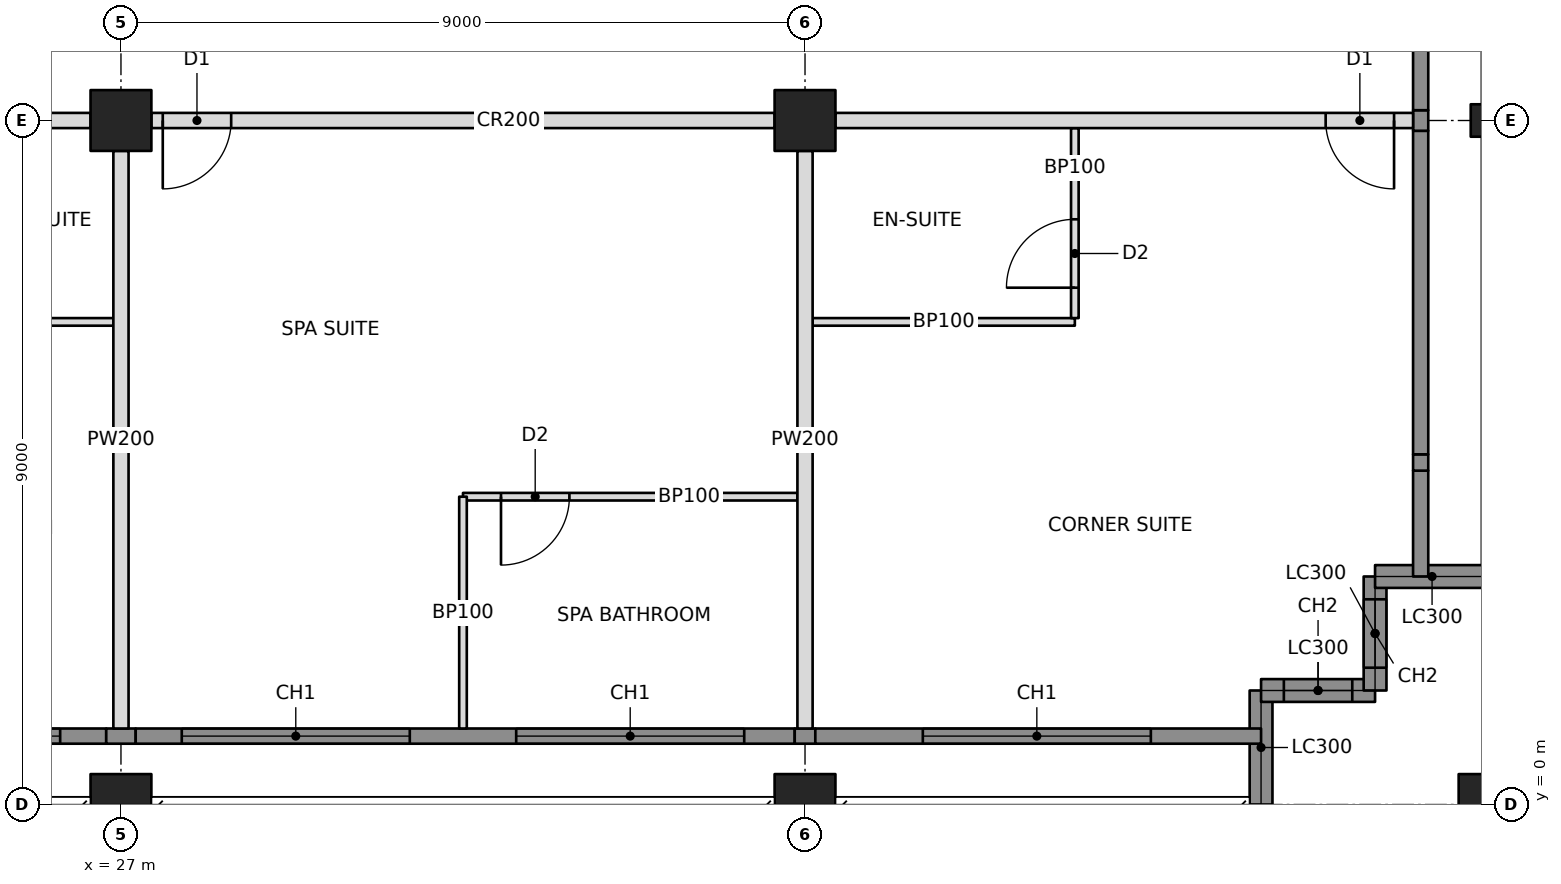
"""IFC4 building model, lengths in metres.
Left out: names, types, materials, properties, quantities, classifications, styles, units other than length and angle.
Written with IfcOpenShell. Run it as: python <this file> out.ifc"""

import sys

from ifc_helpers import new_model, si_unit, direction, frame, frame_2d, origin, origin_2d, place, context, subcontext, project, spatial, rectangle, hollow_rectangle, i_section, extrude, element, fill, save


model = new_model("IFC4")
c1 = context("Model", 3, precision=1e-05, world=origin(), true_north=direction((0.0, 1.0)))
c2 = subcontext(c1, "Body", "Model", "MODEL_VIEW")
j1 = project(units=[si_unit("LENGTHUNIT", "METRE"), si_unit("PLANEANGLEUNIT", "RADIAN")], contexts=[c1])
p1 = place(None, origin())
s1 = spatial("IfcSite", under=j1, at=p1, CompositionType="ELEMENT")
p2 = place(p1, origin())
s2 = spatial("IfcBuilding", under=s1, at=p2, CompositionType="ELEMENT")
p3 = place(p2, frame((0.0, 0.0, 197.8)))
s3 = spatial("IfcBuildingStorey", under=s2, at=p3, CompositionType="ELEMENT", Elevation=197.8)
p4 = place(p3, frame((27.0, 0.0, 0.0), z_axis=(0.0, 0.0, 1.0), x_axis=(1.0, 0.0, 0.0)))
e1 = element("IfcColumn", 1, at=p4, inside=s3, PredefinedType="COLUMN", context=c2, shape_type="SweptSolid", body=[
    extrude(hollow_rectangle(XDim=0.8, YDim=0.8, WallThickness=0.06, at=origin_2d()), origin(), (0.0, 0.0, 1.0), 3.4),
])
p5 = place(p3, frame((27.0, 9.0, 0.0), z_axis=(0.0, 0.0, 1.0), x_axis=(1.0, 0.0, 0.0)))
e2 = element("IfcColumn", 2, at=p5, inside=s3, PredefinedType="COLUMN", context=c2, shape_type="SweptSolid", body=[
    extrude(hollow_rectangle(XDim=0.8, YDim=0.8, WallThickness=0.05, at=origin_2d()), origin(), (0.0, 0.0, 1.0), 3.4),
])
p6 = place(p3, frame((36.0, 0.0, 0.0), z_axis=(0.0, 0.0, 1.0), x_axis=(1.0, 0.0, 0.0)))
e3 = element("IfcColumn", 3, at=p6, inside=s3, PredefinedType="COLUMN", context=c2, shape_type="SweptSolid", body=[
    extrude(hollow_rectangle(XDim=0.8, YDim=0.8, WallThickness=0.06, at=origin_2d()), origin(), (0.0, 0.0, 1.0), 3.4),
])
p7 = place(p3, frame((36.0, 9.0, 0.0), z_axis=(0.0, 0.0, 1.0), x_axis=(0.0, 1.0, 0.0)))
e4 = element("IfcColumn", 4, at=p7, inside=s3, PredefinedType="COLUMN", context=c2, shape_type="SweptSolid", body=[
    extrude(hollow_rectangle(XDim=0.8, YDim=0.8, WallThickness=0.05, at=origin_2d()), origin(), (0.0, 0.0, 1.0), 3.4),
])
p8 = place(p3, frame((45.0, 0.0, 0.0), z_axis=(0.0, 0.0, 1.0), x_axis=(1.0, 0.0, 0.0)))
e5 = element("IfcColumn", 5, at=p8, inside=s3, PredefinedType="COLUMN", context=c2, shape_type="SweptSolid", body=[
    extrude(hollow_rectangle(XDim=0.8, YDim=0.8, WallThickness=0.06, at=origin_2d()), origin(), (0.0, 0.0, 1.0), 3.4),
])
p9 = place(p3, frame((45.0, 9.0, 0.0), z_axis=(0.0, 0.0, 1.0), x_axis=(0.0, 1.0, 0.0)))
e6 = element("IfcColumn", 6, at=p9, inside=s3, PredefinedType="COLUMN", context=c2, shape_type="SweptSolid", body=[
    extrude(i_section(OverallWidth=0.427, OverallDepth=0.483, WebThickness=0.051, FlangeThickness=0.082, at=origin_2d()), origin(), (0.0, 0.0, 1.0), 3.4),
])
p10 = place(p3, frame((42.0, 0.0, 0.0), z_axis=(0.0, 0.0, 1.0), x_axis=(0.0, 1.0, 0.0)))
e7 = element("IfcWall", 7, at=p10, inside=s3, PredefinedType="SOLIDWALL", context=c2, shape_type="SweptSolid", body=[
    extrude(rectangle(XDim=1.5, YDim=0.3, at=frame_2d((0.75, 0.0))), origin(), (0.0, 0.0, 1.0), 2.42),
])
p11 = place(p3, frame((42.0, 1.5, 0.0), z_axis=(0.0, 0.0, 1.0), x_axis=(1.0, 0.0, 0.0)))
e8 = element("IfcWall", 8, at=p11, inside=s3, PredefinedType="SOLIDWALL", context=c2, shape_type="SweptSolid", body=[
    extrude(rectangle(XDim=1.5, YDim=0.3, at=frame_2d((0.75, 0.0))), origin(), (0.0, 0.0, 1.0), 3.2),
])
p12 = place(p11, frame((0.3, 0.0, 0.6)))
e9 = element("IfcOpeningElement", 9, at=p12, cuts=e8, PredefinedType="OPENING", context=c2, shape_type="SweptSolid", body=[
    extrude(rectangle(XDim=0.9, YDim=2.2, at=frame_2d((0.45, 1.1))), frame((0.0, 0.16, 0.0), z_axis=(0.0, -1.0, 0.0), x_axis=(1.0, 0.0, 0.0)), (0.0, 0.0, 1.0), 0.32),
])
p13 = place(p3, frame((43.5, 1.5, 0.0), z_axis=(0.0, 0.0, 1.0), x_axis=(0.0, 1.0, 0.0)))
e10 = element("IfcWall", 10, at=p13, inside=s3, PredefinedType="SOLIDWALL", context=c2, shape_type="SweptSolid", body=[
    extrude(rectangle(XDim=1.5, YDim=0.3, at=frame_2d((0.75, 0.0))), origin(), (0.0, 0.0, 1.0), 3.2),
])
p14 = place(p13, frame((0.3, 0.0, 0.6)))
e11 = element("IfcOpeningElement", 11, at=p14, cuts=e10, PredefinedType="OPENING", context=c2, shape_type="SweptSolid", body=[
    extrude(rectangle(XDim=0.9, YDim=2.2, at=frame_2d((0.45, 1.1))), frame((0.0, 0.16, 0.0), z_axis=(0.0, -1.0, 0.0), x_axis=(1.0, 0.0, 0.0)), (0.0, 0.0, 1.0), 0.32),
])
p15 = place(p3, frame((43.5, 3.0, 0.0), z_axis=(0.0, 0.0, 1.0), x_axis=(1.0, 0.0, 0.0)))
e12 = element("IfcWall", 12, at=p15, inside=s3, PredefinedType="SOLIDWALL", context=c2, shape_type="SweptSolid", body=[
    extrude(rectangle(XDim=1.5, YDim=0.3, at=frame_2d((0.75, 0.0))), origin(), (0.0, 0.0, 1.0), 2.42),
])
p16 = place(p3, frame((44.1, 3.0, 0.0), z_axis=(0.0, 0.0, 1.0), x_axis=(0.0, 1.0, 0.0)))
e13 = element("IfcWall", 13, at=p16, inside=s3, PredefinedType="SOLIDWALL", context=c2, shape_type="SweptSolid", body=[
    extrude(rectangle(XDim=1.393, YDim=0.2, at=frame_2d((0.696, 0.0))), origin(), (0.0, 0.0, 1.0), 3.2),
])
p17 = place(p3, frame((18.4, 9.0, 0.0), z_axis=(0.0, 0.0, 1.0), x_axis=(1.0, 0.0, 0.0)))
e14 = element("IfcWall", 14, at=p17, inside=s3, PredefinedType="PARTITIONING", context=c2, shape_type="SweptSolid", body=[
    extrude(rectangle(XDim=8.2, YDim=0.2, at=frame_2d((4.1, 0.0))), origin(), (0.0, 0.0, 1.0), 2.405),
])
p18 = place(p17, frame((4.35, 0.0, 0.0)))
e15 = element("IfcOpeningElement", 15, at=p18, cuts=e14, PredefinedType="OPENING", context=c2, shape_type="SweptSolid", body=[
    extrude(rectangle(XDim=0.9, YDim=2.1, at=frame_2d((0.45, 1.05))), frame((0.0, 0.11, 0.0), z_axis=(0.0, -1.0, 0.0), x_axis=(1.0, 0.0, 0.0)), (0.0, 0.0, 1.0), 0.22),
])
p19 = place(p3, frame((27.4, 9.0, 0.0), z_axis=(0.0, 0.0, 1.0), x_axis=(1.0, 0.0, 0.0)))
e16 = element("IfcWall", 16, at=p19, inside=s3, PredefinedType="PARTITIONING", context=c2, shape_type="SweptSolid", body=[
    extrude(rectangle(XDim=8.2, YDim=0.2, at=frame_2d((4.1, 0.0))), origin(), (0.0, 0.0, 1.0), 2.405),
])
p20 = place(p19, frame((0.15, 0.0, 0.0)))
e17 = element("IfcOpeningElement", 17, at=p20, cuts=e16, PredefinedType="OPENING", context=c2, shape_type="SweptSolid", body=[
    extrude(rectangle(XDim=0.9, YDim=2.1, at=frame_2d((0.45, 1.05))), frame((0.0, 0.11, 0.0), z_axis=(0.0, -1.0, 0.0), x_axis=(1.0, 0.0, 0.0)), (0.0, 0.0, 1.0), 0.22),
])
p21 = place(p3, frame((36.4, 9.0, 0.0), z_axis=(0.0, 0.0, 1.0), x_axis=(1.0, 0.0, 0.0)))
e18 = element("IfcWall", 18, at=p21, inside=s3, PredefinedType="PARTITIONING", context=c2, shape_type="SweptSolid", body=[
    extrude(rectangle(XDim=7.6, YDim=0.2, at=frame_2d((3.8, 0.0))), origin(), (0.0, 0.0, 1.0), 2.438),
])
p22 = place(p21, frame((6.45, 0.0, 0.0)))
e19 = element("IfcOpeningElement", 19, at=p22, cuts=e18, PredefinedType="OPENING", context=c2, shape_type="SweptSolid", body=[
    extrude(rectangle(XDim=0.9, YDim=2.1, at=frame_2d((0.45, 1.05))), frame((0.0, 0.11, 0.0), z_axis=(0.0, -1.0, 0.0), x_axis=(1.0, 0.0, 0.0)), (0.0, 0.0, 1.0), 0.22),
])
p23 = place(p3, frame((27.0, 8.6, 0.0), z_axis=(0.0, 0.0, 1.0), x_axis=(0.0, -1.0, 0.0)))
e20 = element("IfcWall", 20, at=p23, inside=s3, PredefinedType="PARTITIONING", context=c2, shape_type="SweptSolid", body=[
    extrude(rectangle(XDim=7.6, YDim=0.2, at=frame_2d((3.8, 0.0))), origin(), (0.0, 0.0, 1.0), 2.405),
])
p24 = place(p3, frame((36.0, 8.6, 0.0), z_axis=(0.0, 0.0, 1.0), x_axis=(0.0, -1.0, 0.0)))
e21 = element("IfcWall", 21, at=p24, inside=s3, PredefinedType="PARTITIONING", context=c2, shape_type="SweptSolid", body=[
    extrude(rectangle(XDim=7.6, YDim=0.2, at=frame_2d((3.8, 0.0))), origin(), (0.0, 0.0, 1.0), 2.438),
])
p25 = place(p3, frame((23.95, 6.35, 0.0), z_axis=(0.0, 0.0, 1.0), x_axis=(1.0, 0.0, 0.0)))
e22 = element("IfcWall", 22, at=p25, inside=s3, PredefinedType="PARTITIONING", context=c2, shape_type="SweptSolid", body=[
    extrude(rectangle(XDim=2.95, YDim=0.1, at=frame_2d((1.475, 0.0))), origin(), (0.0, 0.0, 1.0), 2.404),
])
p26 = place(p3, frame((31.5, 4.05, 0.0), z_axis=(0.0, 0.0, 1.0), x_axis=(1.0, 0.0, 0.0)))
e23 = element("IfcWall", 23, at=p26, inside=s3, PredefinedType="PARTITIONING", context=c2, shape_type="SweptSolid", body=[
    extrude(rectangle(XDim=4.4, YDim=0.1, at=frame_2d((2.2, 0.0))), origin(), (0.0, 0.0, 1.0), 2.438),
])
p27 = place(p26, frame((0.5, 0.0, 0.0)))
e24 = element("IfcOpeningElement", 24, at=p27, cuts=e23, PredefinedType="OPENING", context=c2, shape_type="SweptSolid", body=[
    extrude(rectangle(XDim=0.9, YDim=2.1, at=frame_2d((0.45, 1.05))), frame((0.0, 0.06, 0.0), z_axis=(0.0, -1.0, 0.0), x_axis=(1.0, 0.0, 0.0)), (0.0, 0.0, 1.0), 0.12),
])
p28 = place(p3, frame((31.5, 4.05, 0.0), z_axis=(0.0, 0.0, 1.0), x_axis=(0.0, -1.0, 0.0)))
e25 = element("IfcWall", 25, at=p28, inside=s3, PredefinedType="PARTITIONING", context=c2, shape_type="SweptSolid", body=[
    extrude(rectangle(XDim=3.05, YDim=0.1, at=frame_2d((1.525, 0.0))), origin(), (0.0, 0.0, 1.0), 3.2),
])
p29 = place(p3, frame((36.1, 6.35, 0.0), z_axis=(0.0, 0.0, 1.0), x_axis=(1.0, 0.0, 0.0)))
e26 = element("IfcWall", 26, at=p29, inside=s3, PredefinedType="PARTITIONING", context=c2, shape_type="SweptSolid", body=[
    extrude(rectangle(XDim=3.45, YDim=0.1, at=frame_2d((1.725, 0.0))), origin(), (0.0, 0.0, 1.0), 2.438),
])
p30 = place(p3, frame((39.55, 8.9, 0.0), z_axis=(0.0, 0.0, 1.0), x_axis=(0.0, -1.0, 0.0)))
e27 = element("IfcWall", 27, at=p30, inside=s3, PredefinedType="PARTITIONING", context=c2, shape_type="SweptSolid", body=[
    extrude(rectangle(XDim=2.5, YDim=0.1, at=frame_2d((1.25, 0.0))), origin(), (0.0, 0.0, 1.0), 2.438),
])
p31 = place(p30, frame((1.2, 0.0, 0.0)))
e28 = element("IfcOpeningElement", 28, at=p31, cuts=e27, PredefinedType="OPENING", context=c2, shape_type="SweptSolid", body=[
    extrude(rectangle(XDim=0.9, YDim=2.1, at=frame_2d((0.45, 1.05))), frame((0.0, 0.06, 0.0), z_axis=(0.0, -1.0, 0.0), x_axis=(1.0, 0.0, 0.0)), (0.0, 0.0, 1.0), 0.12),
])
p32 = place(p3, frame((18.194, 0.9, 0.0), z_axis=(0.0, 0.0, 1.0), x_axis=(1.0, 0.0, 0.0)))
e29 = element("IfcWall", 29, at=p32, inside=s3, PredefinedType="SOLIDWALL", context=c2, shape_type="SweptSolid", body=[
    extrude(rectangle(XDim=8.612, YDim=0.2, at=frame_2d((4.306, 0.0))), origin(), (0.0, 0.0, 1.0), 3.2),
])
p33 = place(p32, frame((0.606, 0.0, 0.6)))
e30 = element("IfcOpeningElement", 30, at=p33, cuts=e29, PredefinedType="OPENING", context=c2, shape_type="SweptSolid", body=[
    extrude(rectangle(XDim=3.0, YDim=2.2, at=frame_2d((1.5, 1.1))), frame((0.0, 0.11, 0.0), z_axis=(0.0, -1.0, 0.0), x_axis=(1.0, 0.0, 0.0)), (0.0, 0.0, 1.0), 0.22),
])
p34 = place(p32, frame((5.006, 0.0, 0.6)))
e31 = element("IfcOpeningElement", 31, at=p34, cuts=e29, PredefinedType="OPENING", context=c2, shape_type="SweptSolid", body=[
    extrude(rectangle(XDim=3.0, YDim=2.2, at=frame_2d((1.5, 1.1))), frame((0.0, 0.11, 0.0), z_axis=(0.0, -1.0, 0.0), x_axis=(1.0, 0.0, 0.0)), (0.0, 0.0, 1.0), 0.22),
])
p35 = place(p3, frame((26.806, 0.9, 0.0), z_axis=(0.0, 0.0, 1.0), x_axis=(1.0, 0.0, 0.0)))
e32 = element("IfcWall", 32, at=p35, inside=s3, PredefinedType="SOLIDWALL", context=c2, shape_type="SweptSolid", body=[
    extrude(rectangle(XDim=0.388, YDim=0.2, at=frame_2d((0.194, 0.0))), origin(), (0.0, 0.0, 1.0), 2.404),
])
p36 = place(p3, frame((27.194, 0.9, 0.0), z_axis=(0.0, 0.0, 1.0), x_axis=(1.0, 0.0, 0.0)))
e33 = element("IfcWall", 33, at=p36, inside=s3, PredefinedType="SOLIDWALL", context=c2, shape_type="SweptSolid", body=[
    extrude(rectangle(XDim=8.671, YDim=0.2, at=frame_2d((4.335, 0.0))), origin(), (0.0, 0.0, 1.0), 3.2),
])
p37 = place(p36, frame((0.606, 0.0, 0.6)))
e34 = element("IfcOpeningElement", 34, at=p37, cuts=e33, PredefinedType="OPENING", context=c2, shape_type="SweptSolid", body=[
    extrude(rectangle(XDim=3.0, YDim=2.2, at=frame_2d((1.5, 1.1))), frame((0.0, 0.11, 0.0), z_axis=(0.0, -1.0, 0.0), x_axis=(1.0, 0.0, 0.0)), (0.0, 0.0, 1.0), 0.22),
])
p38 = place(p36, frame((5.006, 0.0, 0.6)))
e35 = element("IfcOpeningElement", 35, at=p38, cuts=e33, PredefinedType="OPENING", context=c2, shape_type="SweptSolid", body=[
    extrude(rectangle(XDim=3.0, YDim=2.2, at=frame_2d((1.5, 1.1))), frame((0.0, 0.11, 0.0), z_axis=(0.0, -1.0, 0.0), x_axis=(1.0, 0.0, 0.0)), (0.0, 0.0, 1.0), 0.22),
])
p39 = place(p3, frame((35.865, 0.9, 0.0), z_axis=(0.0, 0.0, 1.0), x_axis=(1.0, 0.0, 0.0)))
e36 = element("IfcWall", 36, at=p39, inside=s3, PredefinedType="SOLIDWALL", context=c2, shape_type="SweptSolid", body=[
    extrude(rectangle(XDim=0.271, YDim=0.2, at=frame_2d((0.135, 0.0))), origin(), (0.0, 0.0, 1.0), 2.438),
])
p40 = place(p3, frame((36.135, 0.9, 0.0), z_axis=(0.0, 0.0, 1.0), x_axis=(1.0, 0.0, 0.0)))
e37 = element("IfcWall", 37, at=p40, inside=s3, PredefinedType="SOLIDWALL", context=c2, shape_type="SweptSolid", body=[
    extrude(rectangle(XDim=5.865, YDim=0.2, at=frame_2d((2.932, 0.0))), origin(), (0.0, 0.0, 1.0), 3.2),
])
p41 = place(p40, frame((1.415, 0.0, 0.6)))
e38 = element("IfcOpeningElement", 38, at=p41, cuts=e37, PredefinedType="OPENING", context=c2, shape_type="SweptSolid", body=[
    extrude(rectangle(XDim=3.0, YDim=2.2, at=frame_2d((1.5, 1.1))), frame((0.0, 0.11, 0.0), z_axis=(0.0, -1.0, 0.0), x_axis=(1.0, 0.0, 0.0)), (0.0, 0.0, 1.0), 0.22),
])
p42 = place(p3, frame((44.1, 4.393, 0.0), z_axis=(0.0, 0.0, 1.0), x_axis=(0.0, 1.0, 0.0)))
e39 = element("IfcWall", 39, at=p42, inside=s3, PredefinedType="SOLIDWALL", context=c2, shape_type="SweptSolid", body=[
    extrude(rectangle(XDim=0.215, YDim=0.2, at=frame_2d((0.107, 0.0))), origin(), (0.0, 0.0, 1.0), 2.661),
])
p43 = place(p3, frame((44.1, 4.607, 0.0), z_axis=(0.0, 0.0, 1.0), x_axis=(0.0, 1.0, 0.0)))
e40 = element("IfcWall", 40, at=p43, inside=s3, PredefinedType="SOLIDWALL", context=c2, shape_type="SweptSolid", body=[
    extrude(rectangle(XDim=4.257, YDim=0.2, at=frame_2d((2.129, 0.0))), origin(), (0.0, 0.0, 1.0), 3.2),
])
p44 = place(p3, frame((44.1, 8.865, 0.0), z_axis=(0.0, 0.0, 1.0), x_axis=(0.0, 1.0, 0.0)))
e41 = element("IfcWall", 41, at=p44, inside=s3, PredefinedType="SOLIDWALL", context=c2, shape_type="SweptSolid", body=[
    extrude(rectangle(XDim=0.271, YDim=0.2, at=frame_2d((0.135, 0.0))), origin(), (0.0, 0.0, 1.0), 2.438),
])
p45 = place(p3, frame((44.1, 9.135, 0.0), z_axis=(0.0, 0.0, 1.0), x_axis=(0.0, 1.0, 0.0)))
e42 = element("IfcWall", 42, at=p45, inside=s3, PredefinedType="SOLIDWALL", context=c2, shape_type="SweptSolid", body=[
    extrude(rectangle(XDim=8.671, YDim=0.2, at=frame_2d((4.335, 0.0))), origin(), (0.0, 0.0, 1.0), 3.2),
])
p46 = place(p45, frame((2.015, 0.0, 0.6)))
e43 = element("IfcOpeningElement", 43, at=p46, cuts=e42, PredefinedType="OPENING", context=c2, shape_type="SweptSolid", body=[
    extrude(rectangle(XDim=3.0, YDim=2.2, at=frame_2d((1.5, 1.1))), frame((0.0, 0.11, 0.0), z_axis=(0.0, -1.0, 0.0), x_axis=(1.0, 0.0, 0.0)), (0.0, 0.0, 1.0), 0.22),
])
p47 = place(p45, frame((5.515, 0.0, 0.6)))
e44 = element("IfcOpeningElement", 44, at=p47, cuts=e42, PredefinedType="OPENING", context=c2, shape_type="SweptSolid", body=[
    extrude(rectangle(XDim=3.0, YDim=2.2, at=frame_2d((1.5, 1.1))), frame((0.0, 0.11, 0.0), z_axis=(0.0, -1.0, 0.0), x_axis=(1.0, 0.0, 0.0)), (0.0, 0.0, 1.0), 0.22),
])
p48 = place(p12, origin())
e45 = element("IfcWindow", 45, at=p48, inside=s3, PartitioningType="SINGLE_PANEL", PredefinedType="WINDOW", context=c2, shape_type="SweptSolid", body=[
    extrude(rectangle(XDim=0.9, YDim=2.2, at=frame_2d((0.45, 1.1))), frame((0.0, 0.03, 0.0), z_axis=(0.0, -1.0, 0.0), x_axis=(1.0, 0.0, 0.0)), (0.0, 0.0, 1.0), 0.06),
])
fill(e9, e45)
p49 = place(p14, origin())
e46 = element("IfcWindow", 46, at=p49, inside=s3, PartitioningType="SINGLE_PANEL", PredefinedType="WINDOW", context=c2, shape_type="SweptSolid", body=[
    extrude(rectangle(XDim=0.9, YDim=2.2, at=frame_2d((0.45, 1.1))), frame((0.0, 0.03, 0.0), z_axis=(0.0, -1.0, 0.0), x_axis=(1.0, 0.0, 0.0)), (0.0, 0.0, 1.0), 0.06),
])
fill(e11, e46)
p50 = place(p34, origin())
e47 = element("IfcWindow", 47, at=p50, inside=s3, PartitioningType="TRIPLE_PANEL_VERTICAL", PredefinedType="WINDOW", context=c2, shape_type="SweptSolid", body=[
    extrude(rectangle(XDim=3.0, YDim=2.2, at=frame_2d((1.5, 1.1))), frame((0.0, 0.03, 0.0), z_axis=(0.0, -1.0, 0.0), x_axis=(1.0, 0.0, 0.0)), (0.0, 0.0, 1.0), 0.06),
])
fill(e31, e47)
p51 = place(p37, origin())
e48 = element("IfcWindow", 48, at=p51, inside=s3, PartitioningType="TRIPLE_PANEL_VERTICAL", PredefinedType="WINDOW", context=c2, shape_type="SweptSolid", body=[
    extrude(rectangle(XDim=3.0, YDim=2.2, at=frame_2d((1.5, 1.1))), frame((0.0, 0.03, 0.0), z_axis=(0.0, -1.0, 0.0), x_axis=(1.0, 0.0, 0.0)), (0.0, 0.0, 1.0), 0.06),
])
fill(e34, e48)
p52 = place(p38, origin())
e49 = element("IfcWindow", 49, at=p52, inside=s3, PartitioningType="TRIPLE_PANEL_VERTICAL", PredefinedType="WINDOW", context=c2, shape_type="SweptSolid", body=[
    extrude(rectangle(XDim=3.0, YDim=2.2, at=frame_2d((1.5, 1.1))), frame((0.0, 0.03, 0.0), z_axis=(0.0, -1.0, 0.0), x_axis=(1.0, 0.0, 0.0)), (0.0, 0.0, 1.0), 0.06),
])
fill(e35, e49)
p53 = place(p41, origin())
e50 = element("IfcWindow", 50, at=p53, inside=s3, PartitioningType="TRIPLE_PANEL_VERTICAL", PredefinedType="WINDOW", context=c2, shape_type="SweptSolid", body=[
    extrude(rectangle(XDim=3.0, YDim=2.2, at=frame_2d((1.5, 1.1))), frame((0.0, 0.03, 0.0), z_axis=(0.0, -1.0, 0.0), x_axis=(1.0, 0.0, 0.0)), (0.0, 0.0, 1.0), 0.06),
])
fill(e38, e50)
p54 = place(p27, frame((0.9, 0.0, 0.0), z_axis=(0.0, 0.0, 1.0), x_axis=(-1.0, 0.0, 0.0)))
e51 = element("IfcDoor", 51, at=p54, inside=s3, OperationType="SINGLE_SWING_RIGHT", PredefinedType="DOOR", context=c2, shape_type="SweptSolid", body=[
    extrude(rectangle(XDim=0.9, YDim=2.1, at=frame_2d((0.45, 1.05))), frame((0.0, 0.025, 0.0), z_axis=(0.0, -1.0, 0.0), x_axis=(1.0, 0.0, 0.0)), (0.0, 0.0, 1.0), 0.05),
])
fill(e24, e51)
p55 = place(p20, frame((0.9, 0.0, 0.0), z_axis=(0.0, 0.0, 1.0), x_axis=(-1.0, 0.0, 0.0)))
e52 = element("IfcDoor", 52, at=p55, inside=s3, OperationType="SINGLE_SWING_RIGHT", PredefinedType="DOOR", context=c2, shape_type="SweptSolid", body=[
    extrude(rectangle(XDim=0.9, YDim=2.1, at=frame_2d((0.45, 1.05))), frame((0.0, 0.025, 0.0), z_axis=(0.0, -1.0, 0.0), x_axis=(1.0, 0.0, 0.0)), (0.0, 0.0, 1.0), 0.05),
])
fill(e17, e52)
p56 = place(p31, frame((0.9, 0.0, 0.0), z_axis=(0.0, 0.0, 1.0), x_axis=(-1.0, 0.0, 0.0)))
e53 = element("IfcDoor", 53, at=p56, inside=s3, OperationType="SINGLE_SWING_LEFT", PredefinedType="DOOR", context=c2, shape_type="SweptSolid", body=[
    extrude(rectangle(XDim=0.9, YDim=2.1, at=frame_2d((0.45, 1.05))), frame((0.0, 0.025, 0.0), z_axis=(0.0, -1.0, 0.0), x_axis=(1.0, 0.0, 0.0)), (0.0, 0.0, 1.0), 0.05),
])
fill(e28, e53)
p57 = place(p22, frame((0.9, 0.0, 0.0), z_axis=(0.0, 0.0, 1.0), x_axis=(-1.0, 0.0, 0.0)))
e54 = element("IfcDoor", 54, at=p57, inside=s3, OperationType="SINGLE_SWING_LEFT", PredefinedType="DOOR", context=c2, shape_type="SweptSolid", body=[
    extrude(rectangle(XDim=0.9, YDim=2.1, at=frame_2d((0.45, 1.05))), frame((0.0, 0.025, 0.0), z_axis=(0.0, -1.0, 0.0), x_axis=(1.0, 0.0, 0.0)), (0.0, 0.0, 1.0), 0.05),
])
fill(e19, e54)
save(model, sys.argv[1])
